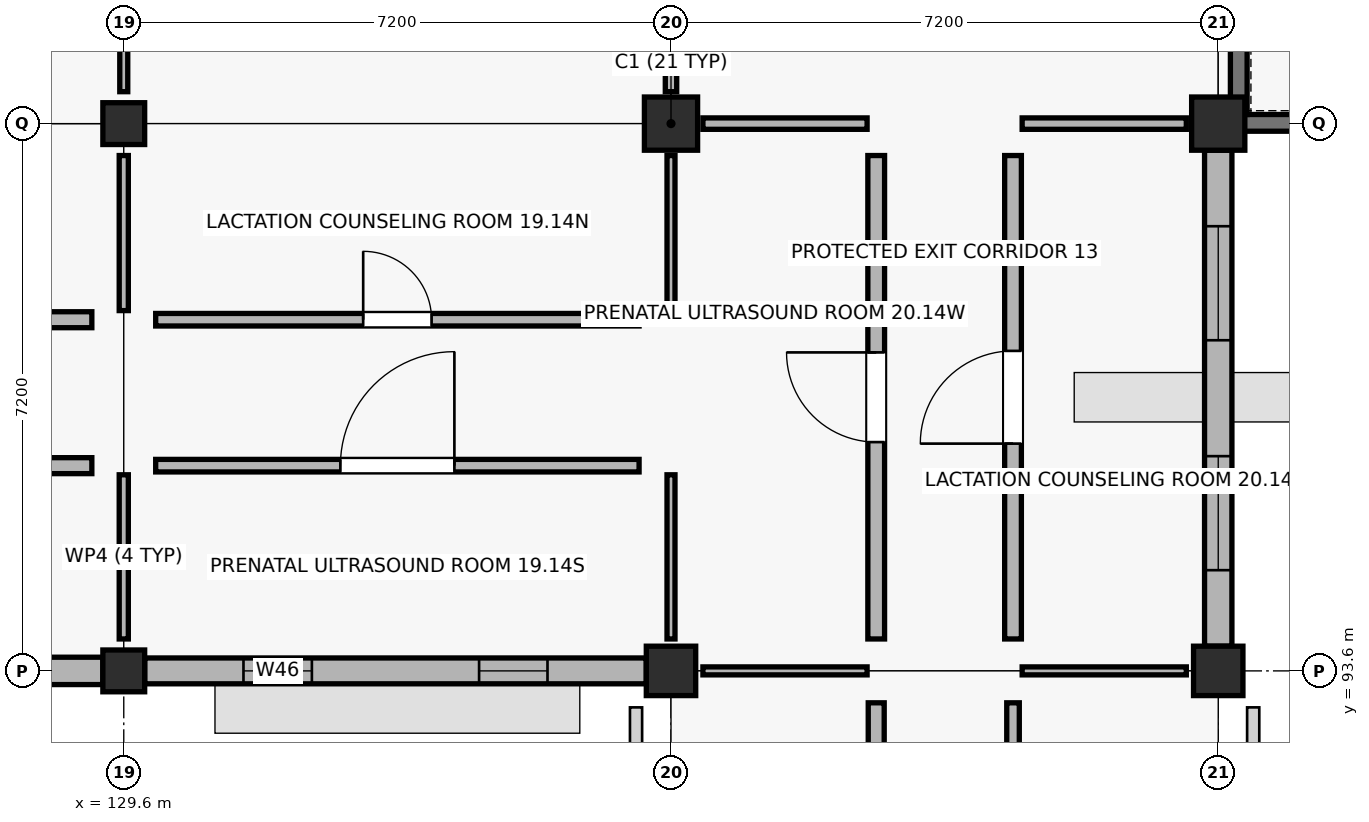
"""IFC4 building model, lengths in metres.
Left out: names, types, materials, properties, quantities, classifications, styles, units other than length and angle.
Written with IfcOpenShell. Run it as: python <this file> out.ifc"""

import sys

from ifc_helpers import new_model, si_unit, direction, frame, frame_2d, origin, origin_2d, place, context, subcontext, project, spatial, rectangle, extrude, element, fill, save


model = new_model("IFC4")
c1 = context("Model", 3, precision=1e-05, world=origin(), true_north=direction((0.0, 1.0)))
c2 = subcontext(c1, "Body", "Model", "MODEL_VIEW")
j1 = project(units=[si_unit("LENGTHUNIT", "METRE"), si_unit("PLANEANGLEUNIT", "RADIAN")], contexts=[c1])
p1 = place(None, origin())
s1 = spatial("IfcSite", under=j1, at=p1, CompositionType="ELEMENT")
p2 = place(p1, origin())
s2 = spatial("IfcBuilding", under=s1, at=p2, CompositionType="ELEMENT")
p3 = place(p2, origin())
s3 = spatial("IfcBuildingStorey", under=s2, at=p3, CompositionType="ELEMENT", Elevation=0.0)
for number, where, z_axis, x_axis in (
    (1, (129.6, 93.6, -0.25), (0.0, 0.0, 1.0), (1.0, 0.0, 0.0)),
    (2, (129.6, 100.8, -0.25), (0.0, 0.0, 1.0), (1.0, 0.0, 0.0)),
):
    element("IfcColumn", number, at=place(p3, frame(where, z_axis=z_axis, x_axis=x_axis)), inside=s3, PredefinedType="COLUMN", context=c2, shape_type="SweptSolid", body=[
        extrude(rectangle(XDim=0.55, YDim=0.55, at=origin_2d()), origin(), (0.0, 0.0, 1.0), 4.75),
    ])
p4 = place(p3, frame((136.8, 93.6, -0.25), z_axis=(0.0, 0.0, 1.0), x_axis=(1.0, 0.0, 0.0)))
e3 = element("IfcColumn", 3, at=p4, inside=s3, PredefinedType="COLUMN", context=c2, shape_type="SweptSolid", body=[
    extrude(rectangle(XDim=0.65, YDim=0.65, at=origin_2d()), origin(), (0.0, 0.0, 1.0), 4.75),
])
p5 = place(p3, frame((136.8, 100.8, -0.25), z_axis=(0.0, 0.0, 1.0), x_axis=(1.0, 0.0, 0.0)))
e4 = element("IfcColumn", 4, at=p5, inside=s3, PredefinedType="COLUMN", context=c2, shape_type="SweptSolid", body=[
    extrude(rectangle(XDim=0.7, YDim=0.7, at=origin_2d()), origin(), (0.0, 0.0, 1.0), 4.75),
])
p6 = place(p3, frame((144.0, 93.6, -0.25), z_axis=(0.0, 0.0, 1.0), x_axis=(1.0, 0.0, 0.0)))
e5 = element("IfcColumn", 5, at=p6, inside=s3, PredefinedType="COLUMN", context=c2, shape_type="SweptSolid", body=[
    extrude(rectangle(XDim=0.65, YDim=0.65, at=origin_2d()), origin(), (0.0, 0.0, 1.0), 4.75),
])
p7 = place(p3, frame((144.0, 100.8, -0.25), z_axis=(0.0, 0.0, 1.0), x_axis=(1.0, 0.0, 0.0)))
e6 = element("IfcColumn", 6, at=p7, inside=s3, PredefinedType="COLUMN", context=c2, shape_type="SweptSolid", body=[
    extrude(rectangle(XDim=0.7, YDim=0.7, at=origin_2d()), origin(), (0.0, 0.0, 1.0), 4.75),
])
p8 = place(p3, frame((122.675, 93.6, 0.0), z_axis=(0.0, 0.0, 1.0), x_axis=(1.0, 0.0, 0.0)))
e7 = element("IfcWall", 7, at=p8, inside=s3, PredefinedType="SOLIDWALL", context=c2, shape_type="SweptSolid", body=[
    extrude(rectangle(XDim=6.65, YDim=0.36, at=frame_2d((3.325, 0.0))), origin(), (0.0, 0.0, 1.0), 3.47),
])
p9 = place(p8, frame((1.0, 0.0, 0.9)))
e8 = element("IfcOpeningElement", 8, at=p9, cuts=e7, PredefinedType="OPENING", context=c2, shape_type="SweptSolid", body=[
    extrude(rectangle(XDim=1.5, YDim=1.75, at=frame_2d((0.75, 0.875))), frame((0.0, 0.19, 0.0), z_axis=(0.0, -1.0, 0.0), x_axis=(1.0, 0.0, 0.0)), (0.0, 0.0, 1.0), 0.38),
])
p10 = place(p8, frame((4.15, 0.0, 0.9)))
e9 = element("IfcOpeningElement", 9, at=p10, cuts=e7, PredefinedType="OPENING", context=c2, shape_type="SweptSolid", body=[
    extrude(rectangle(XDim=1.5, YDim=1.75, at=frame_2d((0.75, 0.875))), frame((0.0, 0.19, 0.0), z_axis=(0.0, -1.0, 0.0), x_axis=(1.0, 0.0, 0.0)), (0.0, 0.0, 1.0), 0.38),
])
p11 = place(p3, frame((129.875, 93.6, 0.0), z_axis=(0.0, 0.0, 1.0), x_axis=(1.0, 0.0, 0.0)))
e10 = element("IfcWall", 10, at=p11, inside=s3, PredefinedType="SOLIDWALL", context=c2, shape_type="SweptSolid", body=[
    extrude(rectangle(XDim=6.6, YDim=0.34, at=frame_2d((3.3, 0.0))), origin(), (0.0, 0.0, 1.0), 3.47),
])
p12 = place(p11, frame((1.3, 0.0, 0.9)))
e11 = element("IfcOpeningElement", 11, at=p12, cuts=e10, PredefinedType="OPENING", context=c2, shape_type="SweptSolid", body=[
    extrude(rectangle(XDim=0.9, YDim=1.88, at=frame_2d((0.45, 0.94))), frame((0.0, 0.18, 0.0), z_axis=(0.0, -1.0, 0.0), x_axis=(1.0, 0.0, 0.0)), (0.0, 0.0, 1.0), 0.36),
])
p13 = place(p11, frame((4.4, 0.0, 0.9)))
e12 = element("IfcOpeningElement", 12, at=p13, cuts=e10, PredefinedType="OPENING", context=c2, shape_type="SweptSolid", body=[
    extrude(rectangle(XDim=0.9, YDim=1.88, at=frame_2d((0.45, 0.94))), frame((0.0, 0.18, 0.0), z_axis=(0.0, -1.0, 0.0), x_axis=(1.0, 0.0, 0.0)), (0.0, 0.0, 1.0), 0.36),
])
p14 = place(p3, frame((144.0, 93.925, 0.0), z_axis=(0.0, 0.0, 1.0), x_axis=(0.0, 1.0, 0.0)))
e13 = element("IfcWall", 13, at=p14, inside=s3, PredefinedType="SOLIDWALL", context=c2, shape_type="SweptSolid", body=[
    extrude(rectangle(XDim=6.525, YDim=0.36, at=frame_2d((3.262, 0.0))), origin(), (0.0, 0.0, 1.0), 3.52),
])
p15 = place(p14, frame((1.0, 0.0, 0.9)))
e14 = element("IfcOpeningElement", 14, at=p15, cuts=e13, PredefinedType="OPENING", context=c2, shape_type="SweptSolid", body=[
    extrude(rectangle(XDim=1.5, YDim=1.25, at=frame_2d((0.75, 0.625))), frame((0.0, 0.19, 0.0), z_axis=(0.0, -1.0, 0.0), x_axis=(1.0, 0.0, 0.0)), (0.0, 0.0, 1.0), 0.38),
])
p16 = place(p14, frame((4.025, 0.0, 0.9)))
e15 = element("IfcOpeningElement", 15, at=p16, cuts=e13, PredefinedType="OPENING", context=c2, shape_type="SweptSolid", body=[
    extrude(rectangle(XDim=1.5, YDim=1.25, at=frame_2d((0.75, 0.625))), frame((0.0, 0.19, 0.0), z_axis=(0.0, -1.0, 0.0), x_axis=(1.0, 0.0, 0.0)), (0.0, 0.0, 1.0), 0.38),
])
p17 = place(p3, frame((144.16, 100.81, -0.25), z_axis=(0.0, 0.0, 1.0), x_axis=(1.0, 0.0, 0.0)))
e16 = element("IfcWall", 16, at=p17, inside=s3, PredefinedType="SHEAR", context=c2, shape_type="SweptSolid", body=[
    extrude(rectangle(XDim=6.88, YDim=0.22, at=frame_2d((3.44, 0.0))), origin(), (0.0, 0.0, 1.0), 4.47),
])
p18 = place(p3, frame((144.27, 100.92, -0.25), z_axis=(0.0, 0.0, 1.0), x_axis=(0.0, 1.0, 0.0)))
e17 = element("IfcWall", 17, at=p18, inside=s3, PredefinedType="SHEAR", context=c2, shape_type="SweptSolid", body=[
    extrude(rectangle(XDim=3.0, YDim=0.22, at=frame_2d((1.5, 0.0))), origin(), (0.0, 0.0, 1.0), 4.47),
])
p19 = place(p3, frame((122.82, 96.3, 0.0), z_axis=(0.0, 0.0, 1.0), x_axis=(1.0, 0.0, 0.0)))
e18 = element("IfcWall", 18, at=p19, inside=s3, PredefinedType="PLUMBINGWALL", context=c2, shape_type="SweptSolid", body=[
    extrude(rectangle(XDim=6.36, YDim=0.21, at=frame_2d((3.18, 0.0))), origin(), (0.0, 0.0, 1.0), 3.36),
])
p20 = place(p19, frame((2.49, 0.0, 0.0)))
e19 = element("IfcOpeningElement", 19, at=p20, cuts=e18, PredefinedType="OPENING", context=c2, shape_type="SweptSolid", body=[
    extrude(rectangle(XDim=1.38, YDim=2.14, at=frame_2d((0.69, 1.07))), frame((0.0, 0.115, 0.0), z_axis=(0.0, -1.0, 0.0), x_axis=(1.0, 0.0, 0.0)), (0.0, 0.0, 1.0), 0.23),
])
p21 = place(p3, frame((129.6, 94.02, 0.0), z_axis=(0.0, 0.0, 1.0), x_axis=(0.0, 1.0, 0.0)))
e20 = element("IfcWall", 20, at=p21, inside=s3, PredefinedType="PARTITIONING", context=c2, shape_type="SweptSolid", body=[
    extrude(rectangle(XDim=2.16, YDim=0.12, at=frame_2d((1.08, 0.0))), origin(), (0.0, 0.0, 1.0), 3.36),
])
p22 = place(p3, frame((122.82, 98.22, 0.0), z_axis=(0.0, 0.0, 1.0), x_axis=(1.0, 0.0, 0.0)))
e21 = element("IfcWall", 21, at=p22, inside=s3, PredefinedType="PLUMBINGWALL", context=c2, shape_type="SweptSolid", body=[
    extrude(rectangle(XDim=6.36, YDim=0.21, at=frame_2d((3.18, 0.0))), origin(), (0.0, 0.0, 1.0), 3.36),
])
p23 = place(p22, frame((2.47, 0.0, 0.0)))
e22 = element("IfcOpeningElement", 22, at=p23, cuts=e21, PredefinedType="OPENING", context=c2, shape_type="SweptSolid", body=[
    extrude(rectangle(XDim=1.42, YDim=2.14, at=frame_2d((0.71, 1.07))), frame((0.0, 0.115, 0.0), z_axis=(0.0, -1.0, 0.0), x_axis=(1.0, 0.0, 0.0)), (0.0, 0.0, 1.0), 0.23),
])
p24 = place(p3, frame((129.6, 98.34, 0.0), z_axis=(0.0, 0.0, 1.0), x_axis=(0.0, 1.0, 0.0)))
e23 = element("IfcWall", 23, at=p24, inside=s3, PredefinedType="PARTITIONING", context=c2, shape_type="SweptSolid", body=[
    extrude(rectangle(XDim=2.04, YDim=0.12, at=frame_2d((1.02, 0.0))), origin(), (0.0, 0.0, 1.0), 3.36),
])
p25 = place(p3, frame((129.6, 101.22, 0.0), z_axis=(0.0, 0.0, 1.0), x_axis=(0.0, 1.0, 0.0)))
e24 = element("IfcWall", 24, at=p25, inside=s3, PredefinedType="PARTITIONING", context=c2, shape_type="SweptSolid", body=[
    extrude(rectangle(XDim=2.16, YDim=0.105, at=frame_2d((1.08, 0.0))), origin(), (0.0, 0.0, 1.0), 3.36),
])
p26 = place(p3, frame((130.02, 96.3, 0.0), z_axis=(0.0, 0.0, 1.0), x_axis=(1.0, 0.0, 0.0)))
e25 = element("IfcWall", 25, at=p26, inside=s3, PredefinedType="PARTITIONING", context=c2, shape_type="SweptSolid", body=[
    extrude(rectangle(XDim=6.36, YDim=0.165, at=frame_2d((3.18, 0.0))), origin(), (0.0, 0.0, 1.0), 3.36),
])
p27 = place(p26, frame((2.43, 0.0, 0.0)))
e26 = element("IfcOpeningElement", 26, at=p27, cuts=e25, PredefinedType="OPENING", context=c2, shape_type="SweptSolid", body=[
    extrude(rectangle(XDim=1.5, YDim=2.14, at=frame_2d((0.75, 1.07))), frame((0.0, 0.093, 0.0), z_axis=(0.0, -1.0, 0.0), x_axis=(1.0, 0.0, 0.0)), (0.0, 0.0, 1.0), 0.185),
])
p28 = place(p3, frame((136.8, 94.02, 0.0), z_axis=(0.0, 0.0, 1.0), x_axis=(0.0, 1.0, 0.0)))
e27 = element("IfcWall", 27, at=p28, inside=s3, PredefinedType="PARTITIONING", context=c2, shape_type="SweptSolid", body=[
    extrude(rectangle(XDim=2.16, YDim=0.105, at=frame_2d((1.08, 0.0))), origin(), (0.0, 0.0, 1.0), 3.36),
])
p29 = place(p3, frame((130.02, 98.22, 0.0), z_axis=(0.0, 0.0, 1.0), x_axis=(1.0, 0.0, 0.0)))
e28 = element("IfcWall", 28, at=p29, inside=s3, PredefinedType="PARTITIONING", context=c2, shape_type="SweptSolid", body=[
    extrude(rectangle(XDim=6.36, YDim=0.165, at=frame_2d((3.18, 0.0))), origin(), (0.0, 0.0, 1.0), 3.36),
])
p30 = place(p29, frame((2.73, 0.0, 0.0)))
e29 = element("IfcOpeningElement", 29, at=p30, cuts=e28, PredefinedType="OPENING", context=c2, shape_type="SweptSolid", body=[
    extrude(rectangle(XDim=0.9, YDim=2.19, at=frame_2d((0.45, 1.095))), frame((0.0, 0.093, 0.0), z_axis=(0.0, -1.0, 0.0), x_axis=(1.0, 0.0, 0.0)), (0.0, 0.0, 1.0), 0.185),
])
p31 = place(p3, frame((136.8, 98.34, 0.0), z_axis=(0.0, 0.0, 1.0), x_axis=(0.0, 1.0, 0.0)))
e30 = element("IfcWall", 30, at=p31, inside=s3, PredefinedType="PARTITIONING", context=c2, shape_type="SweptSolid", body=[
    extrude(rectangle(XDim=2.04, YDim=0.105, at=frame_2d((1.02, 0.0))), origin(), (0.0, 0.0, 1.0), 3.36),
])
p32 = place(p3, frame((136.8, 101.22, 0.0), z_axis=(0.0, 0.0, 1.0), x_axis=(0.0, 1.0, 0.0)))
e31 = element("IfcWall", 31, at=p32, inside=s3, PredefinedType="PARTITIONING", context=c2, shape_type="SweptSolid", body=[
    extrude(rectangle(XDim=2.16, YDim=0.15, at=frame_2d((1.08, 0.0))), origin(), (0.0, 0.0, 1.0), 3.36),
])
p33 = place(p3, frame((139.5, 86.82, 0.0), z_axis=(0.0, 0.0, 1.0), x_axis=(0.0, 1.0, 0.0)))
e32 = element("IfcWall", 32, at=p33, inside=s3, PredefinedType="PLUMBINGWALL", context=c2, shape_type="SweptSolid", body=[
    extrude(rectangle(XDim=6.36, YDim=0.21, at=frame_2d((3.18, 0.0))), origin(), (0.0, 0.0, 1.0), 3.36),
])
p34 = place(p33, frame((2.63, 0.0, 0.0)))
e33 = element("IfcOpeningElement", 33, at=p34, cuts=e32, PredefinedType="OPENING", context=c2, shape_type="SweptSolid", body=[
    extrude(rectangle(XDim=1.1, YDim=2.19, at=frame_2d((0.55, 1.095))), frame((0.0, 0.115, 0.0), z_axis=(0.0, -1.0, 0.0), x_axis=(1.0, 0.0, 0.0)), (0.0, 0.0, 1.0), 0.23),
])
p35 = place(p3, frame((137.22, 93.6, 0.0), z_axis=(0.0, 0.0, 1.0), x_axis=(1.0, 0.0, 0.0)))
e34 = element("IfcWall", 34, at=p35, inside=s3, PredefinedType="PARTITIONING", context=c2, shape_type="SweptSolid", body=[
    extrude(rectangle(XDim=2.16, YDim=0.105, at=frame_2d((1.08, 0.0))), origin(), (0.0, 0.0, 1.0), 3.36),
])
p36 = place(p3, frame((141.3, 86.82, 0.0), z_axis=(0.0, 0.0, 1.0), x_axis=(0.0, 1.0, 0.0)))
e35 = element("IfcWall", 35, at=p36, inside=s3, PredefinedType="PARTITIONING", context=c2, shape_type="SweptSolid", body=[
    extrude(rectangle(XDim=6.36, YDim=0.165, at=frame_2d((3.18, 0.0))), origin(), (0.0, 0.0, 1.0), 3.36),
])
p37 = place(p36, frame((2.61, 0.0, 0.0)))
e36 = element("IfcOpeningElement", 36, at=p37, cuts=e35, PredefinedType="OPENING", context=c2, shape_type="SweptSolid", body=[
    extrude(rectangle(XDim=1.14, YDim=2.19, at=frame_2d((0.57, 1.095))), frame((0.0, 0.093, 0.0), z_axis=(0.0, -1.0, 0.0), x_axis=(1.0, 0.0, 0.0)), (0.0, 0.0, 1.0), 0.185),
])
p38 = place(p3, frame((141.42, 93.6, 0.0), z_axis=(0.0, 0.0, 1.0), x_axis=(1.0, 0.0, 0.0)))
e37 = element("IfcWall", 37, at=p38, inside=s3, PredefinedType="PARTITIONING", context=c2, shape_type="SweptSolid", body=[
    extrude(rectangle(XDim=2.16, YDim=0.105, at=frame_2d((1.08, 0.0))), origin(), (0.0, 0.0, 1.0), 3.36),
])
p39 = place(p3, frame((139.5, 94.02, 0.0), z_axis=(0.0, 0.0, 1.0), x_axis=(0.0, 1.0, 0.0)))
e38 = element("IfcWall", 38, at=p39, inside=s3, PredefinedType="SOLIDWALL", context=c2, shape_type="SweptSolid", body=[
    extrude(rectangle(XDim=6.36, YDim=0.22, at=frame_2d((3.18, 0.0))), origin(), (0.0, 0.0, 1.0), 3.36),
])
p40 = place(p39, frame((2.59, 0.0, 0.0)))
e39 = element("IfcOpeningElement", 39, at=p40, cuts=e38, PredefinedType="OPENING", context=c2, shape_type="SweptSolid", body=[
    extrude(rectangle(XDim=1.18, YDim=2.19, at=frame_2d((0.59, 1.095))), frame((0.0, 0.12, 0.0), z_axis=(0.0, -1.0, 0.0), x_axis=(1.0, 0.0, 0.0)), (0.0, 0.0, 1.0), 0.24),
])
p41 = place(p3, frame((137.22, 100.8, 0.0), z_axis=(0.0, 0.0, 1.0), x_axis=(1.0, 0.0, 0.0)))
e40 = element("IfcWall", 40, at=p41, inside=s3, PredefinedType="PARTITIONING", context=c2, shape_type="SweptSolid", body=[
    extrude(rectangle(XDim=2.16, YDim=0.15, at=frame_2d((1.08, 0.0))), origin(), (0.0, 0.0, 1.0), 3.36),
])
p42 = place(p3, frame((141.3, 94.02, 0.0), z_axis=(0.0, 0.0, 1.0), x_axis=(0.0, 1.0, 0.0)))
e41 = element("IfcWall", 41, at=p42, inside=s3, PredefinedType="SOLIDWALL", context=c2, shape_type="SweptSolid", body=[
    extrude(rectangle(XDim=6.36, YDim=0.22, at=frame_2d((3.18, 0.0))), origin(), (0.0, 0.0, 1.0), 3.36),
])
p43 = place(p42, frame((2.57, 0.0, 0.0)))
e42 = element("IfcOpeningElement", 42, at=p43, cuts=e41, PredefinedType="OPENING", context=c2, shape_type="SweptSolid", body=[
    extrude(rectangle(XDim=1.22, YDim=2.19, at=frame_2d((0.61, 1.095))), frame((0.0, 0.12, 0.0), z_axis=(0.0, -1.0, 0.0), x_axis=(1.0, 0.0, 0.0)), (0.0, 0.0, 1.0), 0.24),
])
p44 = place(p3, frame((141.42, 100.8, 0.0), z_axis=(0.0, 0.0, 1.0), x_axis=(1.0, 0.0, 0.0)))
e43 = element("IfcWall", 43, at=p44, inside=s3, PredefinedType="PARTITIONING", context=c2, shape_type="SweptSolid", body=[
    extrude(rectangle(XDim=2.16, YDim=0.15, at=frame_2d((1.08, 0.0))), origin(), (0.0, 0.0, 1.0), 3.36),
])
p45 = place(p12, origin())
e44 = element("IfcWindow", 44, at=p45, inside=s3, PartitioningType="SINGLE_PANEL", PredefinedType="WINDOW", context=c2, shape_type="SweptSolid", body=[
    extrude(rectangle(XDim=0.9, YDim=1.88, at=frame_2d((0.45, 0.94))), frame((0.0, 0.03, 0.0), z_axis=(0.0, -1.0, 0.0), x_axis=(1.0, 0.0, 0.0)), (0.0, 0.0, 1.0), 0.06),
])
fill(e11, e44)
p46 = place(p13, origin())
e45 = element("IfcWindow", 45, at=p46, inside=s3, PartitioningType="SINGLE_PANEL", PredefinedType="WINDOW", context=c2, shape_type="SweptSolid", body=[
    extrude(rectangle(XDim=0.9, YDim=1.88, at=frame_2d((0.45, 0.94))), frame((0.0, 0.03, 0.0), z_axis=(0.0, -1.0, 0.0), x_axis=(1.0, 0.0, 0.0)), (0.0, 0.0, 1.0), 0.06),
])
fill(e12, e45)
p47 = place(p15, origin())
e46 = element("IfcWindow", 46, at=p47, inside=s3, PartitioningType="SINGLE_PANEL", PredefinedType="WINDOW", context=c2, shape_type="SweptSolid", body=[
    extrude(rectangle(XDim=1.5, YDim=1.25, at=frame_2d((0.75, 0.625))), frame((0.0, 0.03, 0.0), z_axis=(0.0, -1.0, 0.0), x_axis=(1.0, 0.0, 0.0)), (0.0, 0.0, 1.0), 0.06),
])
fill(e14, e46)
p48 = place(p16, origin())
e47 = element("IfcWindow", 47, at=p48, inside=s3, PartitioningType="SINGLE_PANEL", PredefinedType="WINDOW", context=c2, shape_type="SweptSolid", body=[
    extrude(rectangle(XDim=1.5, YDim=1.25, at=frame_2d((0.75, 0.625))), frame((0.0, 0.03, 0.0), z_axis=(0.0, -1.0, 0.0), x_axis=(1.0, 0.0, 0.0)), (0.0, 0.0, 1.0), 0.06),
])
fill(e15, e47)
p49 = place(p27, origin())
e48 = element("IfcDoor", 48, at=p49, inside=s3, OperationType="SINGLE_SWING_RIGHT", PredefinedType="DOOR", context=c2, shape_type="SweptSolid", body=[
    extrude(rectangle(XDim=1.5, YDim=2.14, at=frame_2d((0.75, 1.07))), frame((0.0, 0.025, 0.0), z_axis=(0.0, -1.0, 0.0), x_axis=(1.0, 0.0, 0.0)), (0.0, 0.0, 1.0), 0.05),
])
fill(e26, e48)
p50 = place(p30, origin())
e49 = element("IfcDoor", 49, at=p50, inside=s3, OperationType="SINGLE_SWING_LEFT", PredefinedType="DOOR", context=c2, shape_type="SweptSolid", body=[
    extrude(rectangle(XDim=0.9, YDim=2.19, at=frame_2d((0.45, 1.095))), frame((0.0, 0.025, 0.0), z_axis=(0.0, -1.0, 0.0), x_axis=(1.0, 0.0, 0.0)), (0.0, 0.0, 1.0), 0.05),
])
fill(e29, e49)
p51 = place(p40, origin())
e50 = element("IfcDoor", 50, at=p51, inside=s3, OperationType="SINGLE_SWING_RIGHT", PredefinedType="DOOR", context=c2, shape_type="SweptSolid", body=[
    extrude(rectangle(XDim=1.18, YDim=2.19, at=frame_2d((0.59, 1.095))), frame((0.0, 0.025, 0.0), z_axis=(0.0, -1.0, 0.0), x_axis=(1.0, 0.0, 0.0)), (0.0, 0.0, 1.0), 0.05),
])
fill(e39, e50)
p52 = place(p43, origin())
e51 = element("IfcDoor", 51, at=p52, inside=s3, OperationType="SINGLE_SWING_LEFT", PredefinedType="DOOR", context=c2, shape_type="SweptSolid", body=[
    extrude(rectangle(XDim=1.22, YDim=2.19, at=frame_2d((0.61, 1.095))), frame((0.0, 0.025, 0.0), z_axis=(0.0, -1.0, 0.0), x_axis=(1.0, 0.0, 0.0)), (0.0, 0.0, 1.0), 0.05),
])
fill(e42, e51)
save(model, sys.argv[1])
